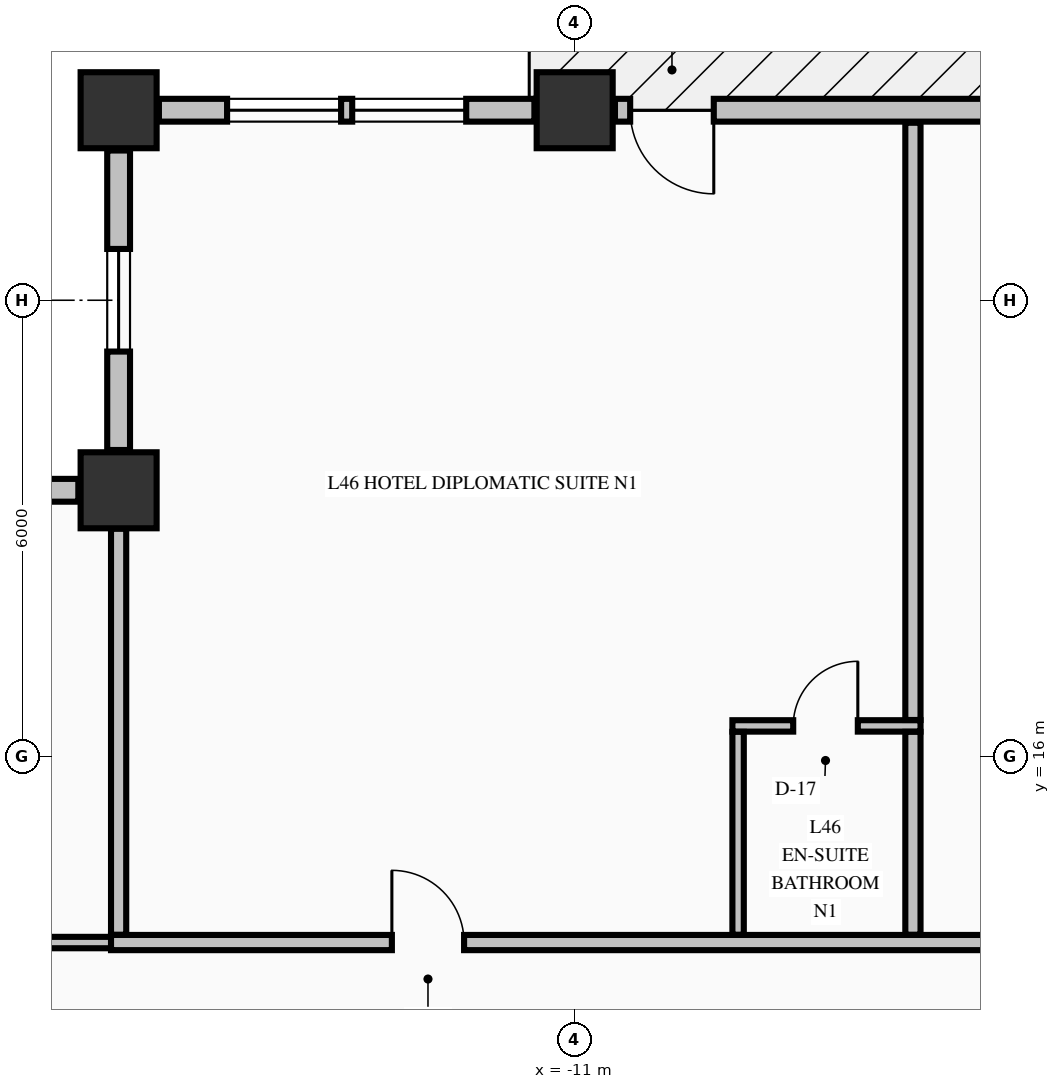
"""IFC4 building model, lengths in metres.
Left out: names, types, materials, properties, quantities, classifications, styles, units other than length and angle.
Written with IfcOpenShell. Run it as: python <this file> out.ifc"""

import sys

from ifc_helpers import new_model, si_unit, direction, frame, frame_2d, origin, origin_2d, place, context, subcontext, project, spatial, rectangle, extrude, element, fill, save


model = new_model("IFC4")
c1 = context("Model", 3, precision=1e-05, world=origin(), true_north=direction((0.0, 1.0)))
c2 = subcontext(c1, "Body", "Model", "MODEL_VIEW")
j1 = project(units=[si_unit("LENGTHUNIT", "METRE"), si_unit("PLANEANGLEUNIT", "RADIAN")], contexts=[c1])
p1 = place(None, origin())
s1 = spatial("IfcSite", under=j1, at=p1, CompositionType="ELEMENT")
p2 = place(p1, origin())
s2 = spatial("IfcBuilding", under=s1, at=p2, CompositionType="ELEMENT")
p3 = place(p2, frame((0.0, 0.0, 179.66)))
s3 = spatial("IfcBuildingStorey", under=s2, at=p3, CompositionType="ELEMENT", Elevation=179.66)
for number, where, z_axis, x_axis in (
    (1, (-17.0, 24.5, -0.25), (0.0, 0.0, 1.0), (1.0, 0.0, 0.0)),
    (2, (-11.0, 24.5, -0.25), (0.0, 0.0, 1.0), (1.0, 0.0, 0.0)),
    (3, (-17.0, 19.5, -0.25), (0.0, 0.0, 1.0), (1.0, 0.0, 0.0)),
):
    element("IfcColumn", number, at=place(p3, frame(where, z_axis=z_axis, x_axis=x_axis)), inside=s3, PredefinedType="COLUMN", context=c2, shape_type="SweptSolid", body=[
        extrude(rectangle(XDim=1.0, YDim=1.0, at=origin_2d()), origin(), (0.0, 0.0, 1.0), 3.4),
    ])
p4 = place(p3, frame((-17.0, 23.97, 0.0), z_axis=(0.0, 0.0, 1.0), x_axis=(0.0, -1.0, 0.0)))
e4 = element("IfcWall", 4, at=p4, inside=s3, PredefinedType="STANDARD", context=c2, shape_type="SweptSolid", body=[
    extrude(rectangle(XDim=3.94, YDim=0.3, at=frame_2d((1.97, 0.0))), origin(), (0.0, 0.0, 1.0), 2.542),
])
p5 = place(p4, frame((1.295, 0.0, 0.68)))
e5 = element("IfcOpeningElement", 5, at=p5, cuts=e4, PredefinedType="OPENING", context=c2, shape_type="SweptSolid", body=[
    extrude(rectangle(XDim=1.35, YDim=1.42, at=frame_2d((0.675, 0.71))), frame((0.0, 0.16, 0.0), z_axis=(0.0, -1.0, 0.0), x_axis=(1.0, 0.0, 0.0)), (0.0, 0.0, 1.0), 0.32),
])
p6 = place(p3, frame((-17.53, 19.5, 0.0), z_axis=(0.0, 0.0, 1.0), x_axis=(-1.0, 0.0, 0.0)))
e6 = element("IfcWall", 6, at=p6, inside=s3, PredefinedType="STANDARD", context=c2, shape_type="SweptSolid", body=[
    extrude(rectangle(XDim=3.94, YDim=0.3, at=frame_2d((1.97, 0.0))), origin(), (0.0, 0.0, 1.0), 2.542),
])
p7 = place(p6, frame((1.295, 0.0, 0.68)))
e7 = element("IfcOpeningElement", 7, at=p7, cuts=e6, PredefinedType="OPENING", context=c2, shape_type="SweptSolid", body=[
    extrude(rectangle(XDim=1.35, YDim=1.42, at=frame_2d((0.675, 0.71))), frame((0.0, 0.16, 0.0), z_axis=(0.0, -1.0, 0.0), x_axis=(1.0, 0.0, 0.0)), (0.0, 0.0, 1.0), 0.32),
])
p8 = place(p3, frame((-11.53, 24.5, 0.0), z_axis=(0.0, 0.0, 1.0), x_axis=(-1.0, 0.0, 0.0)))
e8 = element("IfcWall", 8, at=p8, inside=s3, PredefinedType="STANDARD", context=c2, shape_type="SweptSolid", body=[
    extrude(rectangle(XDim=4.94, YDim=0.3, at=frame_2d((2.47, 0.0))), origin(), (0.0, 0.0, 1.0), 2.542),
])
p9 = place(p8, frame((0.897, 0.0, 0.72)))
e9 = element("IfcOpeningElement", 9, at=p9, cuts=e8, PredefinedType="OPENING", context=c2, shape_type="SweptSolid", body=[
    extrude(rectangle(XDim=1.5, YDim=1.6, at=frame_2d((0.75, 0.8))), frame((0.0, 0.16, 0.0), z_axis=(0.0, -1.0, 0.0), x_axis=(1.0, 0.0, 0.0)), (0.0, 0.0, 1.0), 0.32),
])
p10 = place(p8, frame((2.543, 0.0, 0.72)))
e10 = element("IfcOpeningElement", 10, at=p10, cuts=e8, PredefinedType="OPENING", context=c2, shape_type="SweptSolid", body=[
    extrude(rectangle(XDim=1.5, YDim=1.6, at=frame_2d((0.75, 0.8))), frame((0.0, 0.16, 0.0), z_axis=(0.0, -1.0, 0.0), x_axis=(1.0, 0.0, 0.0)), (0.0, 0.0, 1.0), 0.32),
])
p11 = place(p3, frame((-0.53, 24.5, 0.0), z_axis=(0.0, 0.0, 1.0), x_axis=(-1.0, 0.0, 0.0)))
e11 = element("IfcWall", 11, at=p11, inside=s3, PredefinedType="STANDARD", context=c2, shape_type="SweptSolid", body=[
    extrude(rectangle(XDim=9.94, YDim=0.3, at=frame_2d((4.97, 0.0))), origin(), (0.0, 0.0, 1.0), 2.542),
])
p12 = place(p11, frame((8.64, 0.0, 0.0)))
e12 = element("IfcOpeningElement", 12, at=p12, cuts=e11, PredefinedType="OPENING", context=c2, shape_type="SweptSolid", body=[
    extrude(rectangle(XDim=1.1, YDim=2.15, at=frame_2d((0.55, 1.075))), frame((0.0, 0.16, 0.0), z_axis=(0.0, -1.0, 0.0), x_axis=(1.0, 0.0, 0.0)), (0.0, 0.0, 1.0), 0.32),
])
p13 = place(p11, frame((1.238, 0.0, 0.72)))
e13 = element("IfcOpeningElement", 13, at=p13, cuts=e11, PredefinedType="OPENING", context=c2, shape_type="SweptSolid", body=[
    extrude(rectangle(XDim=1.5, YDim=1.6, at=frame_2d((0.75, 0.8))), frame((0.0, 0.16, 0.0), z_axis=(0.0, -1.0, 0.0), x_axis=(1.0, 0.0, 0.0)), (0.0, 0.0, 1.0), 0.32),
])
p14 = place(p11, frame((3.226, 0.0, 0.72)))
e14 = element("IfcOpeningElement", 14, at=p14, cuts=e11, PredefinedType="OPENING", context=c2, shape_type="SweptSolid", body=[
    extrude(rectangle(XDim=1.5, YDim=1.6, at=frame_2d((0.75, 0.8))), frame((0.0, 0.16, 0.0), z_axis=(0.0, -1.0, 0.0), x_axis=(1.0, 0.0, 0.0)), (0.0, 0.0, 1.0), 0.32),
])
p15 = place(p3, frame((-20.075, 13.55, 0.0), z_axis=(0.0, 0.0, 1.0), x_axis=(1.0, 0.0, 0.0)))
e15 = element("IfcWall", 15, at=p15, inside=s3, PredefinedType="PARTITIONING", context=c2, shape_type="SweptSolid", body=[
    extrude(rectangle(XDim=3.175, YDim=0.15, at=frame_2d((1.587, 0.0))), origin(), (0.0, 0.0, 1.0), 3.15),
])
p16 = place(p3, frame((-17.1, 13.55, 0.0), z_axis=(0.0, 0.0, 1.0), x_axis=(1.0, 0.0, 0.0)))
e16 = element("IfcWall", 16, at=p16, inside=s3, PredefinedType="PARTITIONING", context=c2, shape_type="SweptSolid", body=[
    extrude(rectangle(XDim=39.2, YDim=0.2, at=frame_2d((19.6, 0.0))), origin(), (0.0, 0.0, 1.0), 3.15),
])
p17 = place(p16, frame((3.695, 0.0, 0.0)))
e17 = element("IfcOpeningElement", 17, at=p17, cuts=e16, PredefinedType="OPENING", context=c2, shape_type="SweptSolid", body=[
    extrude(rectangle(XDim=0.95, YDim=2.15, at=frame_2d((0.475, 1.075))), frame((0.0, 0.11, 0.0), z_axis=(0.0, -1.0, 0.0), x_axis=(1.0, 0.0, 0.0)), (0.0, 0.0, 1.0), 0.22),
])
p18 = place(p16, frame((11.695, 0.0, 0.0)))
e18 = element("IfcOpeningElement", 18, at=p18, cuts=e16, PredefinedType="OPENING", context=c2, shape_type="SweptSolid", body=[
    extrude(rectangle(XDim=0.95, YDim=2.15, at=frame_2d((0.475, 1.075))), frame((0.0, 0.11, 0.0), z_axis=(0.0, -1.0, 0.0), x_axis=(1.0, 0.0, 0.0)), (0.0, 0.0, 1.0), 0.22),
])
p19 = place(p16, frame((17.125, 0.0, 0.0)))
e19 = element("IfcOpeningElement", 19, at=p19, cuts=e16, PredefinedType="OPENING", context=c2, shape_type="SweptSolid", body=[
    extrude(rectangle(XDim=0.95, YDim=2.15, at=frame_2d((0.475, 1.075))), frame((0.0, 0.11, 0.0), z_axis=(0.0, -1.0, 0.0), x_axis=(1.0, 0.0, 0.0)), (0.0, 0.0, 1.0), 0.22),
])
p20 = place(p16, frame((25.325, 0.0, 0.0)))
e20 = element("IfcOpeningElement", 20, at=p20, cuts=e16, PredefinedType="OPENING", context=c2, shape_type="SweptSolid", body=[
    extrude(rectangle(XDim=0.95, YDim=2.15, at=frame_2d((0.475, 1.075))), frame((0.0, 0.11, 0.0), z_axis=(0.0, -1.0, 0.0), x_axis=(1.0, 0.0, 0.0)), (0.0, 0.0, 1.0), 0.22),
])
p21 = place(p16, frame((33.695, 0.0, 0.0)))
e21 = element("IfcOpeningElement", 21, at=p21, cuts=e16, PredefinedType="OPENING", context=c2, shape_type="SweptSolid", body=[
    extrude(rectangle(XDim=0.95, YDim=2.15, at=frame_2d((0.475, 1.075))), frame((0.0, 0.11, 0.0), z_axis=(0.0, -1.0, 0.0), x_axis=(1.0, 0.0, 0.0)), (0.0, 0.0, 1.0), 0.22),
])
p22 = place(p3, frame((-8.925, 16.4, 0.0), z_axis=(0.0, 0.0, 1.0), x_axis=(1.0, 0.0, 0.0)))
e22 = element("IfcWall", 22, at=p22, inside=s3, PredefinedType="PARTITIONING", context=c2, shape_type="SweptSolid", body=[
    extrude(rectangle(XDim=2.475, YDim=0.15, at=frame_2d((1.238, 0.0))), origin(), (0.0, 0.0, 1.0), 3.15),
])
p23 = place(p22, frame((0.8, 0.0, 0.0)))
e23 = element("IfcOpeningElement", 23, at=p23, cuts=e22, PredefinedType="OPENING", context=c2, shape_type="SweptSolid", body=[
    extrude(rectangle(XDim=0.85, YDim=2.1, at=frame_2d((0.425, 1.05))), frame((0.0, 0.085, 0.0), z_axis=(0.0, -1.0, 0.0), x_axis=(1.0, 0.0, 0.0)), (0.0, 0.0, 1.0), 0.17),
])
p24 = place(p3, frame((-17.0, 13.653, 0.0), z_axis=(0.0, 0.0, 1.0), x_axis=(0.0, 1.0, 0.0)))
e24 = element("IfcWall", 24, at=p24, inside=s3, PredefinedType="PARTITIONING", context=c2, shape_type="SweptSolid", body=[
    extrude(rectangle(XDim=5.341, YDim=0.2, at=frame_2d((2.67, 0.0))), origin(), (0.0, 0.0, 1.0), 3.15),
])
p25 = place(p3, frame((-8.85, 13.653, 0.0), z_axis=(0.0, 0.0, 1.0), x_axis=(0.0, 1.0, 0.0)))
e25 = element("IfcWall", 25, at=p25, inside=s3, PredefinedType="PARTITIONING", context=c2, shape_type="SweptSolid", body=[
    extrude(rectangle(XDim=2.669, YDim=0.15, at=frame_2d((1.334, 0.0))), origin(), (0.0, 0.0, 1.0), 3.15),
])
p26 = place(p3, frame((-6.55, 13.653, 0.0), z_axis=(0.0, 0.0, 1.0), x_axis=(0.0, 1.0, 0.0)))
e26 = element("IfcWall", 26, at=p26, inside=s3, PredefinedType="PARTITIONING", context=c2, shape_type="SweptSolid", body=[
    extrude(rectangle(XDim=2.669, YDim=0.2, at=frame_2d((1.334, 0.0))), origin(), (0.0, 0.0, 1.0), 3.15),
])
p27 = place(p3, frame((-6.55, 16.478, 0.0), z_axis=(0.0, 0.0, 1.0), x_axis=(0.0, 1.0, 0.0)))
e27 = element("IfcWall", 27, at=p27, inside=s3, PredefinedType="PARTITIONING", context=c2, shape_type="SweptSolid", body=[
    extrude(rectangle(XDim=7.857, YDim=0.2, at=frame_2d((3.928, 0.0))), origin(), (0.0, 0.0, 1.0), 3.15),
])
p28 = place(p5, origin())
e28 = element("IfcWindow", 28, at=p28, inside=s3, PartitioningType="SINGLE_PANEL", PredefinedType="WINDOW", context=c2, shape_type="SweptSolid", body=[
    extrude(rectangle(XDim=1.35, YDim=1.42, at=frame_2d((0.675, 0.71))), frame((0.0, 0.03, 0.0), z_axis=(0.0, -1.0, 0.0), x_axis=(1.0, 0.0, 0.0)), (0.0, 0.0, 1.0), 0.06),
])
fill(e5, e28)
p29 = place(p9, origin())
e29 = element("IfcWindow", 29, at=p29, inside=s3, PartitioningType="SINGLE_PANEL", PredefinedType="WINDOW", context=c2, shape_type="SweptSolid", body=[
    extrude(rectangle(XDim=1.5, YDim=1.6, at=frame_2d((0.75, 0.8))), frame((0.0, 0.03, 0.0), z_axis=(0.0, -1.0, 0.0), x_axis=(1.0, 0.0, 0.0)), (0.0, 0.0, 1.0), 0.06),
])
fill(e9, e29)
p30 = place(p10, origin())
e30 = element("IfcWindow", 30, at=p30, inside=s3, PartitioningType="SINGLE_PANEL", PredefinedType="WINDOW", context=c2, shape_type="SweptSolid", body=[
    extrude(rectangle(XDim=1.5, YDim=1.6, at=frame_2d((0.75, 0.8))), frame((0.0, 0.03, 0.0), z_axis=(0.0, -1.0, 0.0), x_axis=(1.0, 0.0, 0.0)), (0.0, 0.0, 1.0), 0.06),
])
fill(e10, e30)
p31 = place(p12, origin())
e31 = element("IfcDoor", 31, at=p31, inside=s3, OperationType="SINGLE_SWING_LEFT", PredefinedType="DOOR", context=c2, shape_type="SweptSolid", body=[
    extrude(rectangle(XDim=1.1, YDim=2.15, at=frame_2d((0.55, 1.075))), frame((0.0, 0.025, 0.0), z_axis=(0.0, -1.0, 0.0), x_axis=(1.0, 0.0, 0.0)), (0.0, 0.0, 1.0), 0.05),
])
fill(e12, e31)
p32 = place(p17, origin())
e32 = element("IfcDoor", 32, at=p32, inside=s3, OperationType="SINGLE_SWING_LEFT", PredefinedType="DOOR", context=c2, shape_type="SweptSolid", body=[
    extrude(rectangle(XDim=0.95, YDim=2.15, at=frame_2d((0.475, 1.075))), frame((0.0, 0.025, 0.0), z_axis=(0.0, -1.0, 0.0), x_axis=(1.0, 0.0, 0.0)), (0.0, 0.0, 1.0), 0.05),
])
fill(e17, e32)
p33 = place(p23, origin())
e33 = element("IfcDoor", 33, at=p33, inside=s3, OperationType="SINGLE_SWING_RIGHT", PredefinedType="DOOR", context=c2, shape_type="SweptSolid", body=[
    extrude(rectangle(XDim=0.85, YDim=2.1, at=frame_2d((0.425, 1.05))), frame((0.0, 0.025, 0.0), z_axis=(0.0, -1.0, 0.0), x_axis=(1.0, 0.0, 0.0)), (0.0, 0.0, 1.0), 0.05),
])
fill(e23, e33)
save(model, sys.argv[1])
